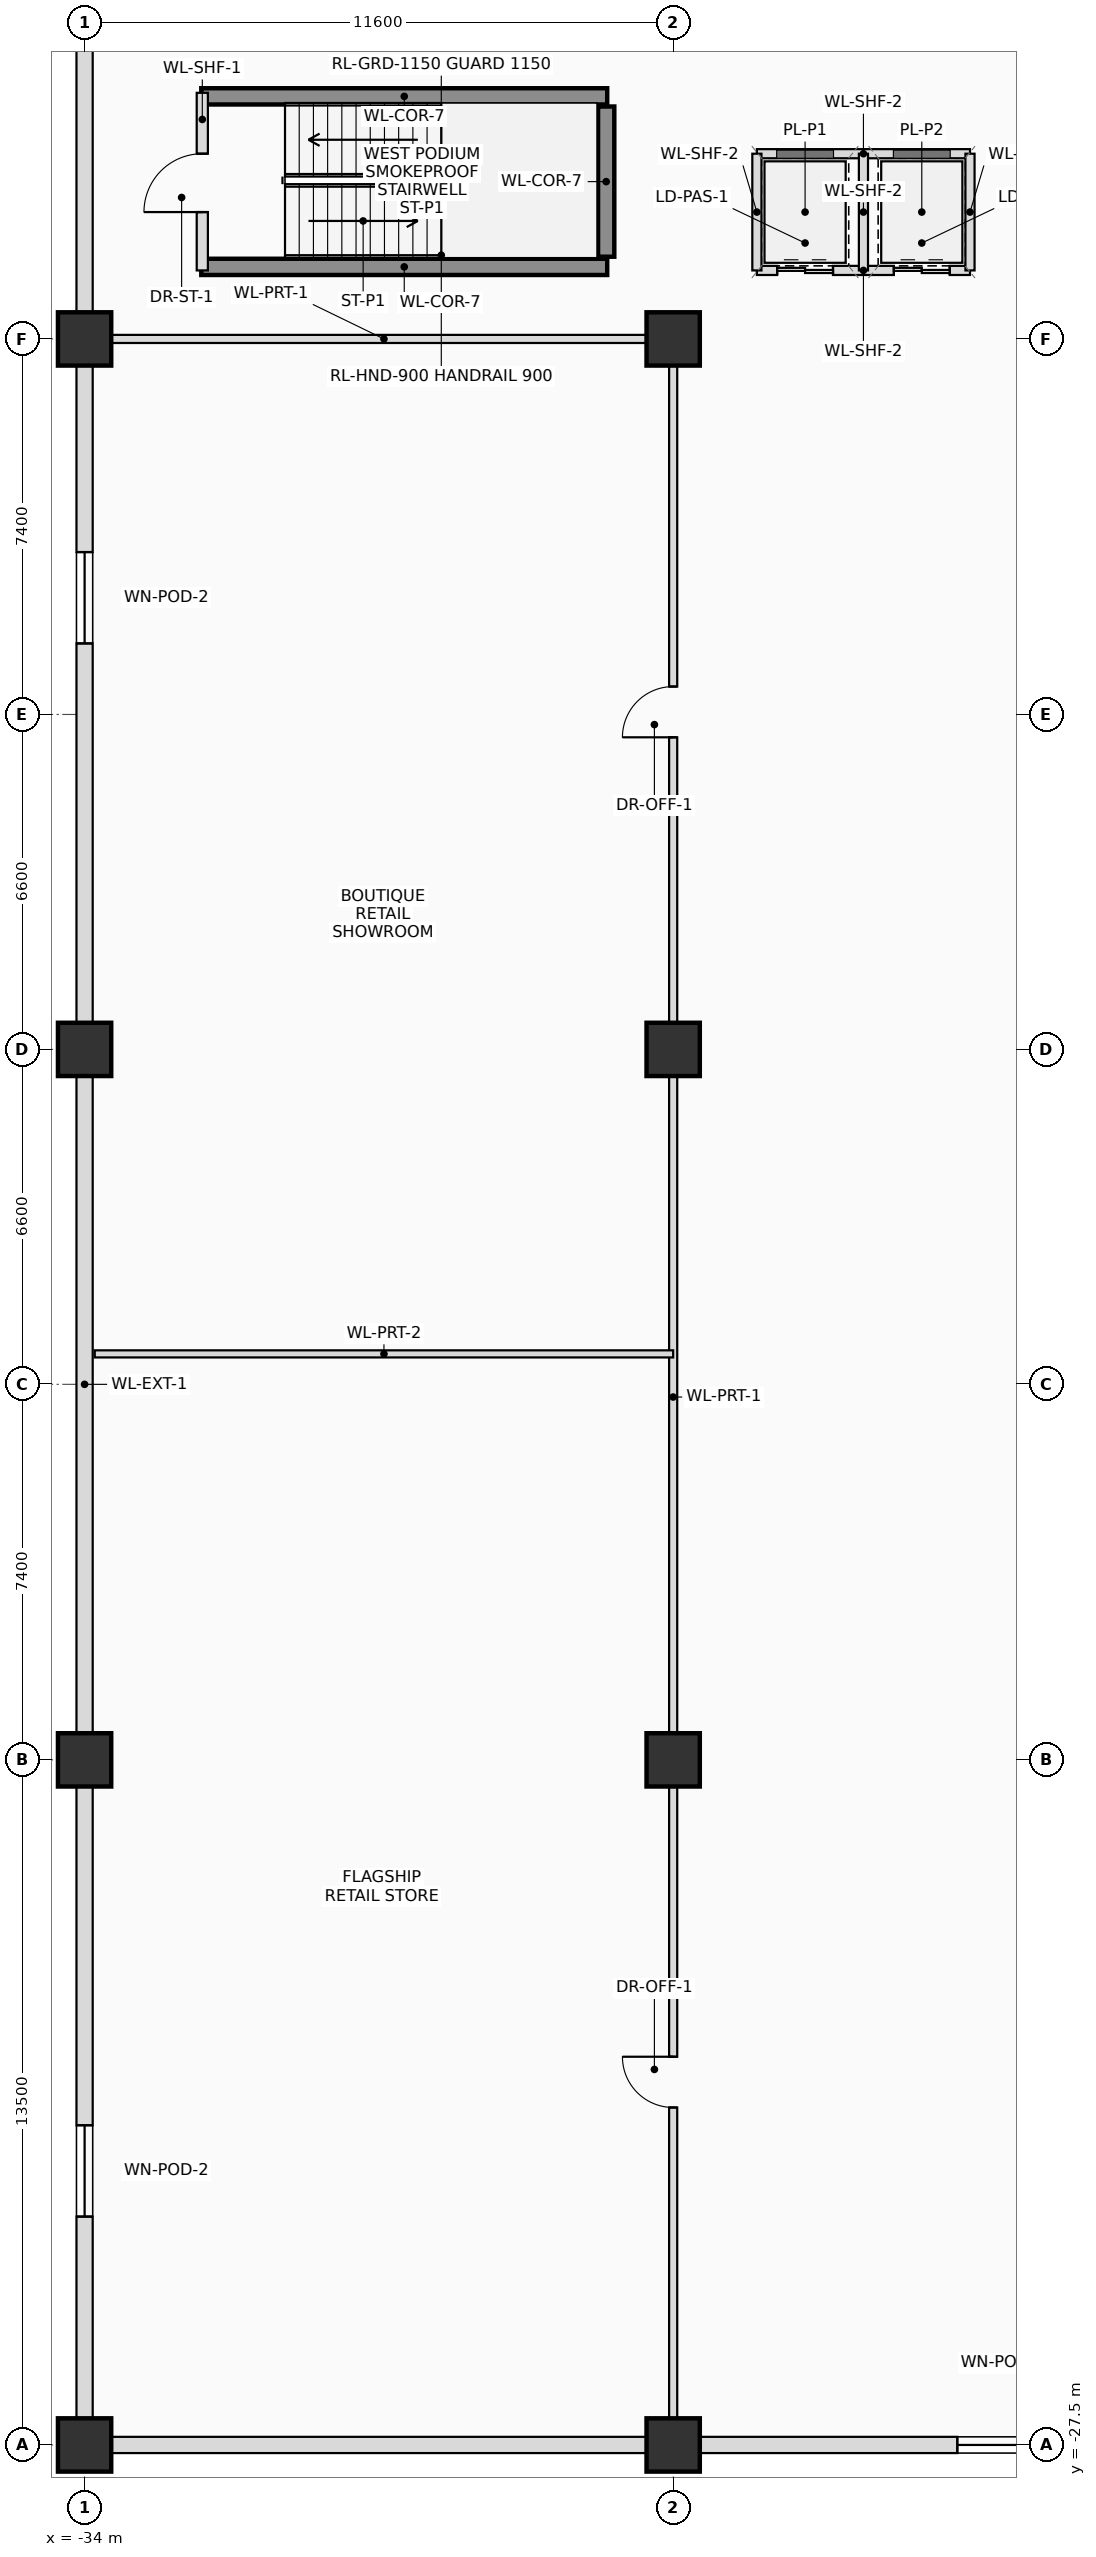
"""IFC4 building model, lengths in metres.
Left out: names, types, materials, properties, quantities, classifications, styles, units other than length and angle.
Written with IfcOpenShell. Run it as: python <this file> out.ifc"""

import sys

from ifc_helpers import new_model, si_unit, direction, frame, frame_2d, origin, origin_2d, place, context, subcontext, project, spatial, rectangle, extrude, source, transform, mapped, element, fill, save


model = new_model("IFC4")
c1 = context("Model", 3, precision=1e-05, world=origin(), true_north=direction((0.0, 1.0)))
c2 = subcontext(c1, "Body", "Model", "MODEL_VIEW")
j1 = project(units=[si_unit("LENGTHUNIT", "METRE"), si_unit("PLANEANGLEUNIT", "RADIAN")], contexts=[c1])
p1 = place(None, origin())
s1 = spatial("IfcSite", under=j1, at=p1, CompositionType="ELEMENT")
p2 = place(p1, origin())
s2 = spatial("IfcBuilding", under=s1, at=p2, CompositionType="ELEMENT")
p3 = place(p2, frame((0.0, 0.0, 4.5)))
s3 = spatial("IfcBuildingStorey", under=s2, at=p3, CompositionType="ELEMENT", Elevation=4.5)
for number, where, z_axis, x_axis in (
    (1, (-31.7, 18.78, 0.0), (0.0, 0.0, 1.0), (1.0, 0.0, 0.0)),
    (2, (-31.7, 15.42, 0.0), (0.0, 0.0, 1.0), (1.0, 0.0, 0.0)),
):
    element("IfcWall", number, at=place(p3, frame(where, z_axis=z_axis, x_axis=x_axis)), inside=s3, PredefinedType="SHEAR", context=c2, shape_type="SweptSolid", body=[
        extrude(rectangle(XDim=8.0, YDim=0.32, at=frame_2d((4.0, 0.0))), origin(), (0.0, 0.0, 1.0), 3.9),
    ])
p4 = place(p3, frame((-23.72, 15.62, 0.0), z_axis=(0.0, 0.0, 1.0), x_axis=(0.0, 1.0, 0.0)))
e3 = element("IfcWall", 3, at=p4, inside=s3, PredefinedType="SHEAR", context=c2, shape_type="SweptSolid", body=[
    extrude(rectangle(XDim=2.96, YDim=0.32, at=frame_2d((1.48, 0.0))), origin(), (0.0, 0.0, 1.0), 3.9),
])
m1 = source(origin(), c2, "Body", "SweptSolid", [
    extrude(rectangle(XDim=1.05, YDim=1.05, at=origin_2d()), origin(), (0.0, 0.0, 1.0), 3.9),
])
for number, where, z_axis, x_axis in (
    (4, (-34.0, -27.5, 0.0), (0.0, 0.0, 1.0), (1.0, 0.0, 0.0)),
    (5, (-22.4, -27.5, 0.0), (0.0, 0.0, 1.0), (1.0, 0.0, 0.0)),
    (6, (-34.0, -14.0, 0.0), (0.0, 0.0, 1.0), (1.0, 0.0, 0.0)),
    (7, (-22.4, -14.0, 0.0), (0.0, 0.0, 1.0), (1.0, 0.0, 0.0)),
    (8, (-34.0, 0.0, 0.0), (0.0, 0.0, 1.0), (1.0, 0.0, 0.0)),
    (9, (-22.4, 0.0, 0.0), (0.0, 0.0, 1.0), (1.0, 0.0, 0.0)),
    (10, (-34.0, 14.0, 0.0), (0.0, 0.0, 1.0), (1.0, 0.0, 0.0)),
    (11, (-22.4, 14.0, 0.0), (0.0, 0.0, 1.0), (1.0, 0.0, 0.0)),
):
    element("IfcColumn", number, at=place(p3, frame(where, z_axis=z_axis, x_axis=x_axis)), inside=s3, PredefinedType="COLUMN", context=c2, shape_type="MappedRepresentation", body=[
        mapped(m1, transform((0.0, 0.0, 0.0), scale=1.0)),
    ])
p5 = place(p3, frame((34.0, -27.5, 0.0), z_axis=(0.0, 0.0, 1.0), x_axis=(-1.0, 0.0, 0.0)))
e12 = element("IfcWall", 12, at=p5, inside=s3, PredefinedType="SOLIDWALL", context=c2, shape_type="SweptSolid", body=[
    extrude(rectangle(XDim=68.0, YDim=0.32, at=frame_2d((34.0, 0.0))), origin(), (0.0, 0.0, 1.0), 2.65),
])
p6 = place(p5, frame((16.0, 0.0, 0.65)))
e13 = element("IfcOpeningElement", 13, at=p6, cuts=e12, PredefinedType="OPENING", context=c2, shape_type="SweptSolid", body=[
    extrude(rectangle(XDim=1.8, YDim=1.8, at=frame_2d((0.9, 0.9))), frame((0.0, 0.17, 0.0), z_axis=(0.0, -1.0, 0.0), x_axis=(1.0, 0.0, 0.0)), (0.0, 0.0, 1.0), 0.34),
])
p7 = place(p5, frame((49.0, 0.0, 0.65)))
e14 = element("IfcOpeningElement", 14, at=p7, cuts=e12, PredefinedType="OPENING", context=c2, shape_type="SweptSolid", body=[
    extrude(rectangle(XDim=1.8, YDim=1.8, at=frame_2d((0.9, 0.9))), frame((0.0, 0.17, 0.0), z_axis=(0.0, -1.0, 0.0), x_axis=(1.0, 0.0, 0.0)), (0.0, 0.0, 1.0), 0.34),
])
p8 = place(p3, frame((-34.0, -27.5, 0.0), z_axis=(0.0, 0.0, 1.0), x_axis=(0.0, 1.0, 0.0)))
e15 = element("IfcWall", 15, at=p8, inside=s3, PredefinedType="SOLIDWALL", context=c2, shape_type="SweptSolid", body=[
    extrude(rectangle(XDim=57.0, YDim=0.32, at=frame_2d((28.5, 0.0))), origin(), (0.0, 0.0, 1.0), 2.65),
])
p9 = place(p8, frame((4.5, 0.0, 0.65)))
e16 = element("IfcOpeningElement", 16, at=p9, cuts=e15, PredefinedType="OPENING", context=c2, shape_type="SweptSolid", body=[
    extrude(rectangle(XDim=1.8, YDim=1.8, at=frame_2d((0.9, 0.9))), frame((0.0, 0.17, 0.0), z_axis=(0.0, -1.0, 0.0), x_axis=(1.0, 0.0, 0.0)), (0.0, 0.0, 1.0), 0.34),
])
p10 = place(p8, frame((35.5, 0.0, 0.65)))
e17 = element("IfcOpeningElement", 17, at=p10, cuts=e15, PredefinedType="OPENING", context=c2, shape_type="SweptSolid", body=[
    extrude(rectangle(XDim=1.8, YDim=1.8, at=frame_2d((0.9, 0.9))), frame((0.0, 0.17, 0.0), z_axis=(0.0, -1.0, 0.0), x_axis=(1.0, 0.0, 0.0)), (0.0, 0.0, 1.0), 0.34),
])
p11 = place(p3, frame((-31.68, 15.35, 0.0), z_axis=(0.0, 0.0, 1.0), x_axis=(0.0, 1.0, 0.0)))
e18 = element("IfcWall", 18, at=p11, inside=s3, PredefinedType="PLUMBINGWALL", context=c2, shape_type="SweptSolid", body=[
    extrude(rectangle(XDim=3.5, YDim=0.22, at=frame_2d((1.75, 0.0))), origin(), (0.0, 0.0, 1.0), 3.3),
])
p12 = place(p11, frame((1.15, 0.0, 0.0)))
e19 = element("IfcOpeningElement", 19, at=p12, cuts=e18, PredefinedType="OPENING", context=c2, shape_type="SweptSolid", body=[
    extrude(rectangle(XDim=1.15, YDim=2.15, at=frame_2d((0.575, 1.075))), frame((0.0, 0.12, 0.0), z_axis=(0.0, -1.0, 0.0), x_axis=(1.0, 0.0, 0.0)), (0.0, 0.0, 1.0), 0.24),
])
p13 = place(p3, frame((-20.75, 15.35, 0.0), z_axis=(0.0, 0.0, 1.0), x_axis=(1.0, 0.0, 0.0)))
e20 = element("IfcWall", 20, at=p13, inside=s3, PredefinedType="PLUMBINGWALL", context=c2, shape_type="SweptSolid", body=[
    extrude(rectangle(XDim=4.2, YDim=0.18, at=frame_2d((2.1, 0.0))), origin(), (0.0, 0.0, 1.0), 3.57),
])
p14 = place(p13, frame((0.4, 0.0, 0.0)))
e21 = element("IfcOpeningElement", 21, at=p14, cuts=e20, PredefinedType="OPENING", context=c2, shape_type="SweptSolid", body=[
    extrude(rectangle(XDim=1.1, YDim=2.2, at=frame_2d((0.55, 1.1))), frame((0.0, 0.1, 0.0), z_axis=(0.0, -1.0, 0.0), x_axis=(1.0, 0.0, 0.0)), (0.0, 0.0, 1.0), 0.2),
])
p15 = place(p13, frame((2.7, 0.0, 0.0)))
e22 = element("IfcOpeningElement", 22, at=p15, cuts=e20, PredefinedType="OPENING", context=c2, shape_type="SweptSolid", body=[
    extrude(rectangle(XDim=1.1, YDim=2.2, at=frame_2d((0.55, 1.1))), frame((0.0, 0.1, 0.0), z_axis=(0.0, -1.0, 0.0), x_axis=(1.0, 0.0, 0.0)), (0.0, 0.0, 1.0), 0.2),
])
p16 = place(p3, frame((-20.75, 17.65, 0.0), z_axis=(0.0, 0.0, 1.0), x_axis=(1.0, 0.0, 0.0)))
e23 = element("IfcWall", 23, at=p16, inside=s3, PredefinedType="PLUMBINGWALL", context=c2, shape_type="SweptSolid", body=[
    extrude(rectangle(XDim=4.2, YDim=0.18, at=frame_2d((2.1, 0.0))), origin(), (0.0, 0.0, 1.0), 3.57),
])
for number, where, z_axis, x_axis in (
    (24, (-20.75, 15.35, 0.0), (0.0, 0.0, 1.0), (0.0, 1.0, 0.0)),
    (25, (-18.65, 15.35, 0.0), (0.0, 0.0, 1.0), (0.0, 1.0, 0.0)),
    (26, (-16.55, 15.35, 0.0), (0.0, 0.0, 1.0), (0.0, 1.0, 0.0)),
):
    element("IfcWall", number, at=place(p3, frame(where, z_axis=z_axis, x_axis=x_axis)), inside=s3, PredefinedType="PLUMBINGWALL", context=c2, shape_type="SweptSolid", body=[
        extrude(rectangle(XDim=2.3, YDim=0.18, at=frame_2d((1.15, 0.0))), origin(), (0.0, 0.0, 1.0), 3.57),
    ])
p17 = place(p3, frame((-22.4, -27.35, 0.0), z_axis=(0.0, 0.0, 1.0), x_axis=(0.0, 1.0, 0.0)))
e27 = element("IfcWall", 27, at=p17, inside=s3, PredefinedType="PARTITIONING", context=c2, shape_type="SweptSolid", body=[
    extrude(rectangle(XDim=41.35, YDim=0.16, at=frame_2d((20.675, 0.0))), origin(), (0.0, 0.0, 1.0), 2.775),
])
p18 = place(p17, frame((6.5, 0.0, 0.0)))
e28 = element("IfcOpeningElement", 28, at=p18, cuts=e27, PredefinedType="OPENING", context=c2, shape_type="SweptSolid", body=[
    extrude(rectangle(XDim=1.0, YDim=2.25, at=frame_2d((0.5, 1.125))), frame((0.0, 0.09, 0.0), z_axis=(0.0, -1.0, 0.0), x_axis=(1.0, 0.0, 0.0)), (0.0, 0.0, 1.0), 0.18),
])
p19 = place(p17, frame((33.5, 0.0, 0.0)))
e29 = element("IfcOpeningElement", 29, at=p19, cuts=e27, PredefinedType="OPENING", context=c2, shape_type="SweptSolid", body=[
    extrude(rectangle(XDim=1.0, YDim=2.25, at=frame_2d((0.5, 1.125))), frame((0.0, 0.09, 0.0), z_axis=(0.0, -1.0, 0.0), x_axis=(1.0, 0.0, 0.0)), (0.0, 0.0, 1.0), 0.18),
])
p20 = place(p3, frame((-33.8, 14.0, 0.0), z_axis=(0.0, 0.0, 1.0), x_axis=(1.0, 0.0, 0.0)))
e30 = element("IfcWall", 30, at=p20, inside=s3, PredefinedType="PARTITIONING", context=c2, shape_type="SweptSolid", body=[
    extrude(rectangle(XDim=11.4, YDim=0.16, at=frame_2d((5.7, 0.0))), origin(), (0.0, 0.0, 1.0), 2.775),
])
p21 = place(p3, frame((-33.8, -6.0, 0.0), z_axis=(0.0, 0.0, 1.0), x_axis=(1.0, 0.0, 0.0)))
e31 = element("IfcWall", 31, at=p21, inside=s3, PredefinedType="PARTITIONING", context=c2, shape_type="SweptSolid", body=[
    extrude(rectangle(XDim=11.4, YDim=0.14, at=frame_2d((5.7, 0.0))), origin(), (0.0, 0.0, 1.0), 2.775),
])
p22 = place(p7, origin())
e32 = element("IfcWindow", 32, at=p22, inside=s3, PartitioningType="SINGLE_PANEL", PredefinedType="WINDOW", context=c2, shape_type="SweptSolid", body=[
    extrude(rectangle(XDim=1.8, YDim=1.8, at=frame_2d((0.9, 0.9))), frame((0.0, 0.03, 0.0), z_axis=(0.0, -1.0, 0.0), x_axis=(1.0, 0.0, 0.0)), (0.0, 0.0, 1.0), 0.06),
])
fill(e14, e32)
p23 = place(p9, origin())
e33 = element("IfcWindow", 33, at=p23, inside=s3, PartitioningType="SINGLE_PANEL", PredefinedType="WINDOW", context=c2, shape_type="SweptSolid", body=[
    extrude(rectangle(XDim=1.8, YDim=1.8, at=frame_2d((0.9, 0.9))), frame((0.0, 0.03, 0.0), z_axis=(0.0, -1.0, 0.0), x_axis=(1.0, 0.0, 0.0)), (0.0, 0.0, 1.0), 0.06),
])
fill(e16, e33)
p24 = place(p10, origin())
e34 = element("IfcWindow", 34, at=p24, inside=s3, PartitioningType="SINGLE_PANEL", PredefinedType="WINDOW", context=c2, shape_type="SweptSolid", body=[
    extrude(rectangle(XDim=1.8, YDim=1.8, at=frame_2d((0.9, 0.9))), frame((0.0, 0.03, 0.0), z_axis=(0.0, -1.0, 0.0), x_axis=(1.0, 0.0, 0.0)), (0.0, 0.0, 1.0), 0.06),
])
fill(e17, e34)
p25 = place(p12, origin())
e35 = element("IfcDoor", 35, at=p25, inside=s3, OperationType="SINGLE_SWING_LEFT", PredefinedType="DOOR", context=c2, shape_type="SweptSolid", body=[
    extrude(rectangle(XDim=1.15, YDim=2.15, at=frame_2d((0.575, 1.075))), frame((0.0, 0.025, 0.0), z_axis=(0.0, -1.0, 0.0), x_axis=(1.0, 0.0, 0.0)), (0.0, 0.0, 1.0), 0.05),
])
fill(e19, e35)
p26 = place(p14, origin())
e36 = element("IfcDoor", 36, at=p26, inside=s3, OperationType="DOUBLE_DOOR_SLIDING", PredefinedType="DOOR", context=c2, shape_type="SweptSolid", body=[
    extrude(rectangle(XDim=1.1, YDim=2.2, at=frame_2d((0.55, 1.1))), frame((0.0, 0.025, 0.0), z_axis=(0.0, -1.0, 0.0), x_axis=(1.0, 0.0, 0.0)), (0.0, 0.0, 1.0), 0.05),
])
fill(e21, e36)
p27 = place(p15, origin())
e37 = element("IfcDoor", 37, at=p27, inside=s3, OperationType="DOUBLE_DOOR_SLIDING", PredefinedType="DOOR", context=c2, shape_type="SweptSolid", body=[
    extrude(rectangle(XDim=1.1, YDim=2.2, at=frame_2d((0.55, 1.1))), frame((0.0, 0.025, 0.0), z_axis=(0.0, -1.0, 0.0), x_axis=(1.0, 0.0, 0.0)), (0.0, 0.0, 1.0), 0.05),
])
fill(e22, e37)
p28 = place(p18, origin())
e38 = element("IfcDoor", 38, at=p28, inside=s3, OperationType="SINGLE_SWING_RIGHT", PredefinedType="DOOR", context=c2, shape_type="SweptSolid", body=[
    extrude(rectangle(XDim=1.0, YDim=2.25, at=frame_2d((0.5, 1.125))), frame((0.0, 0.025, 0.0), z_axis=(0.0, -1.0, 0.0), x_axis=(1.0, 0.0, 0.0)), (0.0, 0.0, 1.0), 0.05),
])
fill(e28, e38)
p29 = place(p19, origin())
e39 = element("IfcDoor", 39, at=p29, inside=s3, OperationType="SINGLE_SWING_LEFT", PredefinedType="DOOR", context=c2, shape_type="SweptSolid", body=[
    extrude(rectangle(XDim=1.0, YDim=2.25, at=frame_2d((0.5, 1.125))), frame((0.0, 0.025, 0.0), z_axis=(0.0, -1.0, 0.0), x_axis=(1.0, 0.0, 0.0)), (0.0, 0.0, 1.0), 0.05),
])
fill(e29, e39)
save(model, sys.argv[1])
